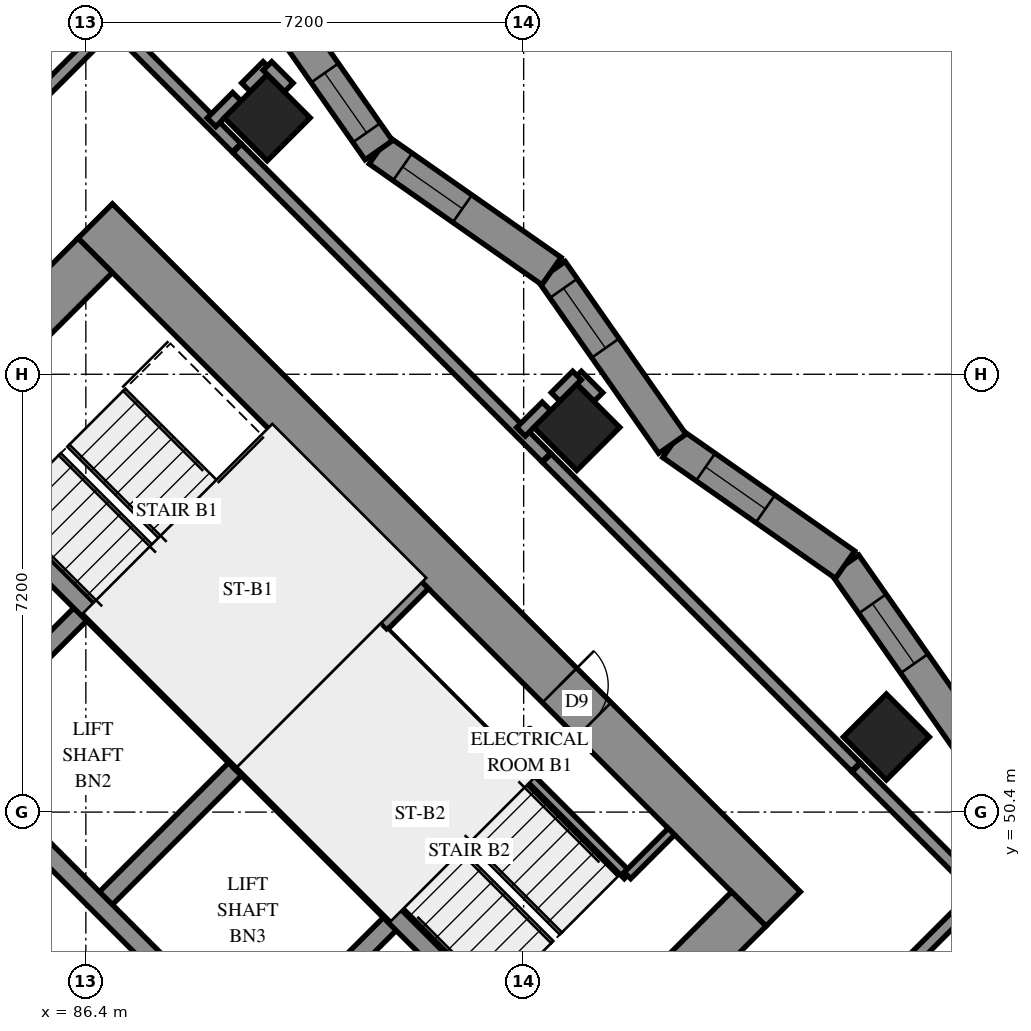
"""IFC4 building model, lengths in metres.
Left out: names, types, materials, properties, quantities, classifications, styles, units other than length and angle.
Written with IfcOpenShell. Run it as: python <this file> out.ifc"""

import sys

from ifc_helpers import new_model, si_unit, direction, frame, frame_2d, origin, origin_2d, place, context, subcontext, project, spatial, polyline, rectangle, outline, extrude, element, fill, save


model = new_model("IFC4")
c1 = context("Model", 3, precision=1e-05, world=origin(), true_north=direction((0.0, 1.0)))
c2 = subcontext(c1, "Body", "Model", "MODEL_VIEW")
j1 = project(units=[si_unit("LENGTHUNIT", "METRE"), si_unit("PLANEANGLEUNIT", "RADIAN")], contexts=[c1])
p1 = place(None, origin())
s1 = spatial("IfcSite", under=j1, at=p1, CompositionType="ELEMENT")
p2 = place(p1, origin())
s2 = spatial("IfcBuilding", under=s1, at=p2, CompositionType="ELEMENT")
p3 = place(p2, frame((0.0, 0.0, 115.2)))
s3 = spatial("IfcBuildingStorey", under=s2, at=p3, CompositionType="ELEMENT", Elevation=115.2)
for number, where, z_axis, x_axis in (
    (1, (89.382, 61.818, 0.0), (0.0, 0.0, 1.0), (0.707, -0.707, 0.0)),
    (2, (94.474, 56.727, 0.0), (0.0, 0.0, 1.0), (0.707, -0.707, 0.0)),
    (3, (99.565, 51.635, 0.0), (0.0, 0.0, 1.0), (0.707, -0.707, 0.0)),
):
    element("IfcColumn", number, at=place(p3, frame(where, z_axis=z_axis, x_axis=x_axis)), inside=s3, PredefinedType="COLUMN", context=c2, shape_type="SweptSolid", body=[
        extrude(rectangle(XDim=1.0, YDim=1.0, at=origin_2d()), origin(), (0.0, 0.0, 1.0), 3.1),
    ])
p4 = place(p3, frame((75.806, 49.373, -0.3), z_axis=(0.0, 0.0, 1.0), x_axis=(0.7071067812, -0.7071067812, 0.0)))
e4 = element("IfcWall", 4, at=p4, inside=s3, PredefinedType="SHEAR", context=c2, shape_type="SweptSolid", body=[
    extrude(rectangle(XDim=16.0, YDim=0.8, at=frame_2d((8.0, 0.0))), origin(), (0.0, 0.0, 1.0), 2.7),
])
p5 = place(p3, frame((86.554, 60.121, -0.3), z_axis=(0.0, 0.0, 1.0), x_axis=(0.7071067812, -0.7071067812, 0.0)))
e5 = element("IfcWall", 5, at=p5, inside=s3, PredefinedType="SHEAR", context=c2, shape_type="SweptSolid", body=[
    extrude(rectangle(XDim=16.0, YDim=0.8, at=frame_2d((8.0, 0.0))), origin(), (0.0, 0.0, 1.0), 2.7),
])
p6 = place(p5, frame((10.8, 0.0, 0.3)))
e6 = element("IfcOpeningElement", 6, at=p6, cuts=e5, PredefinedType="OPENING", context=c2, shape_type="SweptSolid", body=[
    extrude(rectangle(XDim=0.8, YDim=2.1, at=frame_2d((0.4, 1.05))), frame((0.0, 0.41, 0.0), z_axis=(0.0, -1.0, 0.0), x_axis=(1.0, 0.0, 0.0)), (0.0, 0.0, 1.0), 0.82),
])
p7 = place(p3, frame((76.372, 49.373, -0.3), z_axis=(0.0, 0.0, 1.0), x_axis=(0.7071067812, 0.7071067812, 0.0)))
e7 = element("IfcWall", 7, at=p7, inside=s3, PredefinedType="SHEAR", context=c2, shape_type="SweptSolid", body=[
    extrude(rectangle(XDim=14.4, YDim=0.8, at=frame_2d((7.2, 0.0))), origin(), (0.0, 0.0, 1.0), 2.7),
])
p8 = place(p7, frame((4.55, 0.0, 0.3)))
e8 = element("IfcOpeningElement", 8, at=p8, cuts=e7, PredefinedType="OPENING", context=c2, shape_type="SweptSolid", body=[
    extrude(rectangle(XDim=1.1, YDim=2.1, at=frame_2d((0.55, 1.05))), frame((0.0, 0.41, 0.0), z_axis=(0.0, -1.0, 0.0), x_axis=(1.0, 0.0, 0.0)), (0.0, 0.0, 1.0), 0.82),
])
p9 = place(p7, frame((11.35, 0.0, 0.3)))
e9 = element("IfcOpeningElement", 9, at=p9, cuts=e7, PredefinedType="OPENING", context=c2, shape_type="SweptSolid", body=[
    extrude(rectangle(XDim=1.1, YDim=2.1, at=frame_2d((0.55, 1.05))), frame((0.0, 0.41, 0.0), z_axis=(0.0, -1.0, 0.0), x_axis=(1.0, 0.0, 0.0)), (0.0, 0.0, 1.0), 0.82),
])
p10 = place(p3, frame((87.12, 38.625, -0.3), z_axis=(0.0, 0.0, 1.0), x_axis=(0.7071067812, 0.7071067812, 0.0)))
e10 = element("IfcWall", 10, at=p10, inside=s3, PredefinedType="SHEAR", context=c2, shape_type="SweptSolid", body=[
    extrude(rectangle(XDim=14.4, YDim=0.8, at=frame_2d((7.2, 0.0))), origin(), (0.0, 0.0, 1.0), 2.7),
])
p11 = place(p10, frame((4.55, 0.0, 0.3)))
e11 = element("IfcOpeningElement", 11, at=p11, cuts=e10, PredefinedType="OPENING", context=c2, shape_type="SweptSolid", body=[
    extrude(rectangle(XDim=1.1, YDim=2.1, at=frame_2d((0.55, 1.05))), frame((0.0, 0.41, 0.0), z_axis=(0.0, -1.0, 0.0), x_axis=(1.0, 0.0, 0.0)), (0.0, 0.0, 1.0), 0.82),
])
p12 = place(p10, frame((11.35, 0.0, 0.3)))
e12 = element("IfcOpeningElement", 12, at=p12, cuts=e10, PredefinedType="OPENING", context=c2, shape_type="SweptSolid", body=[
    extrude(rectangle(XDim=1.1, YDim=2.1, at=frame_2d((0.55, 1.05))), frame((0.0, 0.41, 0.0), z_axis=(0.0, -1.0, 0.0), x_axis=(1.0, 0.0, 0.0)), (0.0, 0.0, 1.0), 0.82),
])
p13 = place(p3, frame((84.079, 51.423, 0.0), z_axis=(0.0, 0.0, 1.0), x_axis=(0.7071219326, 0.7070916295, 0.0)))
e13 = element("IfcWall", 13, at=p13, inside=s3, PredefinedType="SOLIDWALL", context=c2, shape_type="SweptSolid", body=[
    extrude(rectangle(XDim=3.3, YDim=0.3, at=frame_2d((1.65, 0.0))), origin(), (0.0, 0.0, 1.0), 3.1),
])
for number, where, z_axis, x_axis in (
    (14, (86.625, 48.878, 0.0), (0.0, 0.0, 1.0), (0.707, 0.707, 0.0)),
    (15, (89.17, 46.332, 0.0), (0.0, 0.0, 1.0), (0.707, 0.707, 0.0)),
):
    element("IfcWall", number, at=place(p3, frame(where, z_axis=z_axis, x_axis=x_axis)), inside=s3, PredefinedType="SOLIDWALL", context=c2, shape_type="SweptSolid", body=[
        extrude(rectangle(XDim=3.3, YDim=0.3, at=frame_2d((1.65, 0.0))), origin(), (0.0, 0.0, 1.0), 3.1),
    ])
p14 = place(p3, frame((78.988, 51.423, 0.0), z_axis=(0.0, 0.0, 1.0), x_axis=(0.7071067812, -0.7071067812, 0.0)))
e16 = element("IfcWall", 16, at=p14, inside=s3, PredefinedType="SOLIDWALL", context=c2, shape_type="SweptSolid", body=[
    extrude(rectangle(XDim=14.4, YDim=0.3, at=frame_2d((7.2, 0.0))), origin(), (0.0, 0.0, 1.0), 3.1),
])
p15 = place(p14, frame((1.25, 0.0, 0.0)))
e17 = element("IfcOpeningElement", 17, at=p15, cuts=e16, PredefinedType="OPENING", context=c2, shape_type="SweptSolid", body=[
    extrude(rectangle(XDim=1.1, YDim=2.1, at=frame_2d((0.55, 1.05))), frame((0.0, 0.16, 0.0), z_axis=(0.0, -1.0, 0.0), x_axis=(1.0, 0.0, 0.0)), (0.0, 0.0, 1.0), 0.32),
])
p16 = place(p14, frame((4.85, 0.0, 0.0)))
e18 = element("IfcOpeningElement", 18, at=p16, cuts=e16, PredefinedType="OPENING", context=c2, shape_type="SweptSolid", body=[
    extrude(rectangle(XDim=1.1, YDim=2.1, at=frame_2d((0.55, 1.05))), frame((0.0, 0.16, 0.0), z_axis=(0.0, -1.0, 0.0), x_axis=(1.0, 0.0, 0.0)), (0.0, 0.0, 1.0), 0.32),
])
p17 = place(p14, frame((8.45, 0.0, 0.0)))
e19 = element("IfcOpeningElement", 19, at=p17, cuts=e16, PredefinedType="OPENING", context=c2, shape_type="SweptSolid", body=[
    extrude(rectangle(XDim=1.1, YDim=2.1, at=frame_2d((0.55, 1.05))), frame((0.0, 0.16, 0.0), z_axis=(0.0, -1.0, 0.0), x_axis=(1.0, 0.0, 0.0)), (0.0, 0.0, 1.0), 0.32),
])
p18 = place(p14, frame((12.05, 0.0, 0.0)))
e20 = element("IfcOpeningElement", 20, at=p18, cuts=e16, PredefinedType="OPENING", context=c2, shape_type="SweptSolid", body=[
    extrude(rectangle(XDim=1.1, YDim=2.1, at=frame_2d((0.55, 1.05))), frame((0.0, 0.16, 0.0), z_axis=(0.0, -1.0, 0.0), x_axis=(1.0, 0.0, 0.0)), (0.0, 0.0, 1.0), 0.32),
])
p19 = place(p3, frame((81.534, 53.969, 0.0), z_axis=(0.0, 0.0, 1.0), x_axis=(0.707103309, -0.7071102534, 0.0)))
e21 = element("IfcWall", 21, at=p19, inside=s3, PredefinedType="SOLIDWALL", context=c2, shape_type="SweptSolid", body=[
    extrude(rectangle(XDim=14.4, YDim=0.3, at=frame_2d((7.2, 0.0))), origin(), (0.0, 0.0, 1.0), 3.1),
])
p20 = place(p19, frame((12.05, 0.0, 0.0)))
e22 = element("IfcOpeningElement", 22, at=p20, cuts=e21, PredefinedType="OPENING", context=c2, shape_type="SweptSolid", body=[
    extrude(rectangle(XDim=1.1, YDim=2.1, at=frame_2d((0.55, 1.05))), frame((0.0, 0.16, 0.0), z_axis=(0.0, -1.0, 0.0), x_axis=(1.0, 0.0, 0.0)), (0.0, 0.0, 1.0), 0.32),
])
for number, where, z_axis, x_axis in (
    (23, (83.867, 56.302, 0.0), (0.0, 0.0, 1.0), (0.707, -0.707, 0.0)),
    (24, (88.958, 51.211, 0.0), (0.0, 0.0, 1.0), (0.707, -0.707, 0.0)),
):
    element("IfcWall", number, at=place(p3, frame(where, z_axis=z_axis, x_axis=x_axis)), inside=s3, PredefinedType="SOLIDWALL", context=c2, shape_type="SweptSolid", body=[
        extrude(rectangle(XDim=7.2, YDim=0.3, at=frame_2d((3.6, 0.0))), origin(), (0.0, 0.0, 1.0), 3.1),
    ])
p21 = place(p3, frame((88.958, 51.211, 0.0), z_axis=(0.0, 0.0, 1.0), x_axis=(0.7071067812, 0.7071067812, 0.0)))
e25 = element("IfcWall", 25, at=p21, inside=s3, PredefinedType="SOLIDWALL", context=c2, shape_type="SweptSolid", body=[
    extrude(rectangle(XDim=4.2, YDim=0.3, at=frame_2d((2.1, 0.0))), origin(), (0.0, 0.0, 1.0), 3.1),
])
p22 = place(p3, frame((100.874, 51.629, 0.0), z_axis=(0.0, 0.0, 1.0), x_axis=(-0.5733306936, 0.8193240603, 0.0)))
e26 = element("IfcWall", 26, at=p22, inside=s3, PredefinedType="SOLIDWALL", context=c2, shape_type="SweptSolid", body=[
    extrude(outline(polyline([(0.049, -0.275), (3.515, -0.275), (3.418, 0.275), (-0.049, 0.275), (0.049, -0.275)])), origin(), (0.0, 0.0, 1.0), 3.1),
])
p23 = place(p22, frame((1.481, 0.0, 0.5)))
e27 = element("IfcOpeningElement", 27, at=p23, cuts=e26, PredefinedType="OPENING", context=c2, shape_type="SweptSolid", body=[
    extrude(rectangle(XDim=1.2, YDim=2.45, at=frame_2d((0.6, 1.225))), frame((0.0, 0.285, 0.0), z_axis=(0.0, -1.0, 0.0), x_axis=(1.0, 0.0, 0.0)), (0.0, 0.0, 1.0), 0.57),
])
p24 = place(p3, frame((98.886, 54.469, 0.0), z_axis=(0.0, 0.0, 1.0), x_axis=(-0.8193105103, 0.5733500568, 0.0)))
e28 = element("IfcWall", 28, at=p24, inside=s3, PredefinedType="SOLIDWALL", context=c2, shape_type="SweptSolid", body=[
    extrude(outline(polyline([(-0.049, -0.275), (3.418, -0.275), (3.515, 0.275), (0.049, 0.275), (-0.049, -0.275)])), origin(), (0.0, 0.0, 1.0), 3.1),
])
p25 = place(p24, frame((1.6, 0.0, 0.5)))
e29 = element("IfcOpeningElement", 29, at=p25, cuts=e28, PredefinedType="OPENING", context=c2, shape_type="SweptSolid", body=[
    extrude(rectangle(XDim=1.2, YDim=2.45, at=frame_2d((0.6, 1.225))), frame((0.0, 0.285, 0.0), z_axis=(0.0, -1.0, 0.0), x_axis=(1.0, 0.0, 0.0)), (0.0, 0.0, 1.0), 0.57),
])
p26 = place(p3, frame((96.046, 56.457, 0.0), z_axis=(0.0, 0.0, 1.0), x_axis=(-0.5733500568, 0.8193105103, 0.0)))
e30 = element("IfcWall", 30, at=p26, inside=s3, PredefinedType="SOLIDWALL", context=c2, shape_type="SweptSolid", body=[
    extrude(outline(polyline([(0.049, -0.275), (3.515, -0.275), (3.418, 0.275), (-0.049, 0.275), (0.049, -0.275)])), origin(), (0.0, 0.0, 1.0), 3.1),
])
p27 = place(p26, frame((1.92, 0.0, 0.5)))
e31 = element("IfcOpeningElement", 31, at=p27, cuts=e30, PredefinedType="OPENING", context=c2, shape_type="SweptSolid", body=[
    extrude(rectangle(XDim=1.2, YDim=2.45, at=frame_2d((0.6, 1.225))), frame((0.0, 0.285, 0.0), z_axis=(0.0, -1.0, 0.0), x_axis=(1.0, 0.0, 0.0)), (0.0, 0.0, 1.0), 0.57),
])
p28 = place(p3, frame((94.058, 59.297, 0.0), z_axis=(0.0, 0.0, 1.0), x_axis=(-0.8193240603, 0.5733306936, 0.0)))
e32 = element("IfcWall", 32, at=p28, inside=s3, PredefinedType="SOLIDWALL", context=c2, shape_type="SweptSolid", body=[
    extrude(outline(polyline([(-0.049, -0.275), (3.418, -0.275), (3.515, 0.275), (0.049, 0.275), (-0.049, -0.275)])), origin(), (0.0, 0.0, 1.0), 3.1),
])
p29 = place(p28, frame((1.789, 0.0, 0.5)))
e33 = element("IfcOpeningElement", 33, at=p29, cuts=e32, PredefinedType="OPENING", context=c2, shape_type="SweptSolid", body=[
    extrude(rectangle(XDim=1.2, YDim=2.45, at=frame_2d((0.6, 1.225))), frame((0.0, 0.285, 0.0), z_axis=(0.0, -1.0, 0.0), x_axis=(1.0, 0.0, 0.0)), (0.0, 0.0, 1.0), 0.57),
])
p30 = place(p3, frame((91.217, 61.285, 0.0), z_axis=(0.0, 0.0, 1.0), x_axis=(-0.5733306936, 0.8193240603, 0.0)))
e34 = element("IfcWall", 34, at=p30, inside=s3, PredefinedType="SOLIDWALL", context=c2, shape_type="SweptSolid", body=[
    extrude(outline(polyline([(0.049, -0.275), (3.515, -0.275), (3.418, 0.275), (-0.049, 0.275), (0.049, -0.275)])), origin(), (0.0, 0.0, 1.0), 3.1),
])
p31 = place(p30, frame((0.35, 0.0, 0.5)))
e35 = element("IfcOpeningElement", 35, at=p31, cuts=e34, PredefinedType="OPENING", context=c2, shape_type="SweptSolid", body=[
    extrude(rectangle(XDim=1.2, YDim=2.45, at=frame_2d((0.6, 1.225))), frame((0.0, 0.285, 0.0), z_axis=(0.0, -1.0, 0.0), x_axis=(1.0, 0.0, 0.0)), (0.0, 0.0, 1.0), 0.57),
])
p32 = place(p30, frame((2.351, 0.0, 0.45)))
e36 = element("IfcOpeningElement", 36, at=p32, cuts=e34, PredefinedType="OPENING", context=c2, shape_type="SweptSolid", body=[
    extrude(rectangle(XDim=0.8, YDim=2.5, at=frame_2d((0.4, 1.25))), frame((0.0, 0.285, 0.0), z_axis=(0.0, -1.0, 0.0), x_axis=(1.0, 0.0, 0.0)), (0.0, 0.0, 1.0), 0.57),
])
p33 = place(p3, frame((91.313, 53.354, 0.0), z_axis=(0.0, 0.0, 1.0), x_axis=(0.7071067812, -0.7071067812, 0.0)))
e37 = element("IfcWall", 37, at=p33, inside=s3, PredefinedType="PARTITIONING", context=c2, shape_type="SweptSolid", body=[
    extrude(rectangle(XDim=5.65, YDim=0.15, at=frame_2d((2.825, 0.0))), origin(), (0.0, 0.0, 1.0), 3.1),
])
p34 = place(p3, frame((95.308, 49.358, 0.0), z_axis=(0.0, 0.0, 1.0), x_axis=(0.70705776, 0.707155799, 0.0)))
e38 = element("IfcWall", 38, at=p34, inside=s3, PredefinedType="PARTITIONING", context=c2, shape_type="SweptSolid", body=[
    extrude(rectangle(XDim=1.02, YDim=0.15, at=frame_2d((0.51, 0.0))), origin(), (0.0, 0.0, 1.0), 3.1),
])
p35 = place(p3, frame((80.949, 58.477, 0.0), z_axis=(0.0, 0.0, 1.0), x_axis=(0.7071067812, 0.7071067812, 0.0)))
e39 = element("IfcWall", 39, at=p35, inside=s3, PredefinedType="PARTITIONING", context=c2, shape_type="SweptSolid", body=[
    extrude(rectangle(XDim=9.241, YDim=0.2, at=frame_2d((4.621, 0.0))), origin(), (0.0, 0.0, 1.0), 3.1),
])
p36 = place(p3, frame((81.322, 57.858, 0.0), z_axis=(0.0, 0.0, 1.0), x_axis=(0.7069785544, 0.7072349848, 0.0)))
e40 = element("IfcWall", 40, at=p36, inside=s3, PredefinedType="PARTITIONING", context=c2, shape_type="SweptSolid", body=[
    extrude(rectangle(XDim=7.799, YDim=0.2, at=frame_2d((3.9, 0.0))), origin(), (0.0, 0.0, 1.0), 3.1),
])
p37 = place(p3, frame((95.606, 43.577, 0.0), z_axis=(0.0, 0.0, 1.0), x_axis=(0.7071067812, 0.7071067812, 0.0)))
e41 = element("IfcWall", 41, at=p37, inside=s3, PredefinedType="PARTITIONING", context=c2, shape_type="SweptSolid", body=[
    extrude(rectangle(XDim=7.798, YDim=0.2, at=frame_2d((3.899, 0.0))), origin(), (0.0, 0.0, 1.0), 3.1),
])
p38 = place(p3, frame((88.889, 61.315, 0.0), z_axis=(0.0, 0.0, 1.0), x_axis=(0.7071067812, -0.7071067812, 0.0)))
e42 = element("IfcWall", 42, at=p38, inside=s3, PredefinedType="PARTITIONING", context=c2, shape_type="SweptSolid", body=[
    extrude(rectangle(XDim=7.187, YDim=0.2, at=frame_2d((3.594, 0.0))), origin(), (0.0, 0.0, 1.0), 3.1),
])
p39 = place(p3, frame((93.981, 56.223, 0.0), z_axis=(0.0, 0.0, 1.0), x_axis=(0.7071067812, -0.7071067812, 0.0)))
e43 = element("IfcWall", 43, at=p39, inside=s3, PredefinedType="PARTITIONING", context=c2, shape_type="SweptSolid", body=[
    extrude(rectangle(XDim=7.184, YDim=0.2, at=frame_2d((3.592, 0.0))), origin(), (0.0, 0.0, 1.0), 3.1),
])
p40 = place(p3, frame((97.795, 44.777, 0.0), z_axis=(0.0, 0.0, 1.0), x_axis=(0.707252317, 0.7069612154, 0.0)))
e44 = element("IfcWall", 44, at=p40, inside=s3, PredefinedType="PARTITIONING", context=c2, shape_type="SweptSolid", body=[
    extrude(rectangle(XDim=7.214, YDim=0.2, at=frame_2d((3.607, 0.0))), origin(), (0.0, 0.0, 1.0), 3.1),
])
for number, where, z_axis, x_axis in (
    (45, (86.833, 63.371, 0.0), (0.0, 0.0, 1.0), (0.707, -0.707, 0.0)),
    (46, (99.071, 51.133, 0.0), (0.0, 0.0, 1.0), (0.707, -0.707, 0.0)),
):
    element("IfcWall", number, at=place(p3, frame(where, z_axis=z_axis, x_axis=x_axis)), inside=s3, PredefinedType="PARTITIONING", context=c2, shape_type="SweptSolid", body=[
        extrude(rectangle(XDim=2.893, YDim=0.2, at=frame_2d((1.447, 0.0))), origin(), (0.0, 0.0, 1.0), 3.1),
    ])
for number, where, z_axis, x_axis in (
    (47, (93.556, 56.654, 0.0), (0.0, 0.0, 1.0), (0.709, 0.705, 0.0)),
    (48, (88.467, 61.743, 0.0), (0.0, 0.0, 1.0), (0.705, 0.709, 0.0)),
):
    element("IfcWall", number, at=place(p3, frame(where, z_axis=z_axis, x_axis=x_axis)), inside=s3, PredefinedType="PARTITIONING", context=c2, shape_type="SweptSolid", body=[
        extrude(rectangle(XDim=0.593, YDim=0.2, at=frame_2d((0.296, 0.0))), origin(), (0.0, 0.0, 1.0), 3.1),
    ])
for number, where, z_axis, x_axis in (
    (49, (94.478, 57.578, 0.0), (0.0, 0.0, 1.0), (0.707, -0.707, 0.0)),
    (50, (89.033, 62.319, 0.0), (0.0, 0.0, 1.0), (0.707, 0.707, 0.0)),
    (51, (89.386, 62.67, 0.0), (0.0, 0.0, 1.0), (0.707, -0.707, 0.0)),
    (52, (94.124, 57.228, 0.0), (0.0, 0.0, 1.0), (0.707, 0.707, 0.0)),
):
    element("IfcWall", number, at=place(p3, frame(where, z_axis=z_axis, x_axis=x_axis)), inside=s3, PredefinedType="PARTITIONING", context=c2, shape_type="SweptSolid", body=[
        extrude(rectangle(XDim=0.498, YDim=0.2, at=frame_2d((0.249, 0.0))), origin(), (0.0, 0.0, 1.0), 3.1),
    ])
p41 = place(p23, origin())
e53 = element("IfcWindow", 53, at=p41, inside=s3, PartitioningType="SINGLE_PANEL", PredefinedType="WINDOW", context=c2, shape_type="SweptSolid", body=[
    extrude(rectangle(XDim=1.2, YDim=2.45, at=frame_2d((0.6, 1.225))), frame((0.0, 0.155, 0.0), z_axis=(0.0, -1.0, 0.0), x_axis=(1.0, 0.0, 0.0)), (0.0, 0.0, 1.0), 0.06),
])
fill(e27, e53)
p42 = place(p25, origin())
e54 = element("IfcWindow", 54, at=p42, inside=s3, PartitioningType="SINGLE_PANEL", PredefinedType="WINDOW", context=c2, shape_type="SweptSolid", body=[
    extrude(rectangle(XDim=1.2, YDim=2.45, at=frame_2d((0.6, 1.225))), frame((0.0, 0.155, 0.0), z_axis=(0.0, -1.0, 0.0), x_axis=(1.0, 0.0, 0.0)), (0.0, 0.0, 1.0), 0.06),
])
fill(e29, e54)
p43 = place(p27, origin())
e55 = element("IfcWindow", 55, at=p43, inside=s3, PartitioningType="SINGLE_PANEL", PredefinedType="WINDOW", context=c2, shape_type="SweptSolid", body=[
    extrude(rectangle(XDim=1.2, YDim=2.45, at=frame_2d((0.6, 1.225))), frame((0.0, 0.155, 0.0), z_axis=(0.0, -1.0, 0.0), x_axis=(1.0, 0.0, 0.0)), (0.0, 0.0, 1.0), 0.06),
])
fill(e31, e55)
p44 = place(p29, origin())
e56 = element("IfcWindow", 56, at=p44, inside=s3, PartitioningType="SINGLE_PANEL", PredefinedType="WINDOW", context=c2, shape_type="SweptSolid", body=[
    extrude(rectangle(XDim=1.2, YDim=2.45, at=frame_2d((0.6, 1.225))), frame((0.0, 0.155, 0.0), z_axis=(0.0, -1.0, 0.0), x_axis=(1.0, 0.0, 0.0)), (0.0, 0.0, 1.0), 0.06),
])
fill(e33, e56)
p45 = place(p31, origin())
e57 = element("IfcWindow", 57, at=p45, inside=s3, PartitioningType="SINGLE_PANEL", PredefinedType="WINDOW", context=c2, shape_type="SweptSolid", body=[
    extrude(rectangle(XDim=1.2, YDim=2.45, at=frame_2d((0.6, 1.225))), frame((0.0, 0.155, 0.0), z_axis=(0.0, -1.0, 0.0), x_axis=(1.0, 0.0, 0.0)), (0.0, 0.0, 1.0), 0.06),
])
fill(e35, e57)
p46 = place(p6, origin())
e58 = element("IfcDoor", 58, at=p46, inside=s3, OperationType="SINGLE_SWING_RIGHT", PredefinedType="DOOR", context=c2, shape_type="SweptSolid", body=[
    extrude(rectangle(XDim=0.8, YDim=2.1, at=frame_2d((0.4, 1.05))), frame((0.0, -0.34, 0.0), z_axis=(0.0, -1.0, 0.0), x_axis=(1.0, 0.0, 0.0)), (0.0, 0.0, 1.0), 0.05),
])
fill(e6, e58)
save(model, sys.argv[1])
